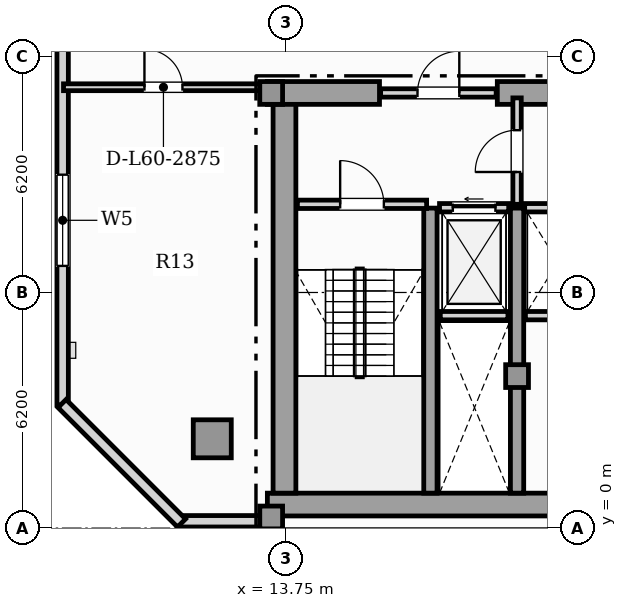
"""IFC4 building model, lengths in metres.
Left out: names, types, materials, properties, quantities, classifications, styles, units other than length and angle.
Written with IfcOpenShell. Run it as: python <this file> out.ifc"""

import sys

from ifc_helpers import new_model, si_unit, direction, frame, frame_2d, origin, origin_2d, place, context, subcontext, project, spatial, rectangle, hollow_rectangle, extrude, element, fill, save


model = new_model("IFC4")
c1 = context("Model", 3, precision=1e-05, world=origin(), true_north=direction((0.0, 1.0)))
c2 = subcontext(c1, "Body", "Model", "MODEL_VIEW")
j1 = project(units=[si_unit("LENGTHUNIT", "METRE"), si_unit("PLANEANGLEUNIT", "RADIAN")], contexts=[c1])
p1 = place(None, origin())
s1 = spatial("IfcSite", under=j1, at=p1, CompositionType="ELEMENT")
p2 = place(p1, origin())
s2 = spatial("IfcBuilding", under=s1, at=p2, CompositionType="ELEMENT")
p3 = place(p2, frame((0.0, 0.0, 242.65)))
s3 = spatial("IfcBuildingStorey", under=s2, at=p3, CompositionType="ELEMENT", Elevation=242.65)
p4 = place(p3, frame((13.25, 0.62, 0.0), z_axis=(0.0, 0.0, 1.0), x_axis=(1.0, 0.0, 0.0)))
e1 = element("IfcWall", 1, at=p4, inside=s3, PredefinedType="SHEAR", context=c2, shape_type="SweptSolid", body=[
    extrude(rectangle(XDim=31.0, YDim=0.6, at=frame_2d((15.5, 0.0))), origin(), (0.0, 0.0, 1.0), 3.5),
])
p5 = place(p3, frame((13.7, 0.92, 0.0), z_axis=(0.0, 0.0, 1.0), x_axis=(0.0, 1.0, 0.0)))
e2 = element("IfcWall", 2, at=p5, inside=s3, PredefinedType="SHEAR", context=c2, shape_type="SweptSolid", body=[
    extrude(rectangle(XDim=10.53, YDim=0.6, at=frame_2d((5.265, 0.0))), origin(), (0.0, 0.0, 1.0), 3.5),
])
p6 = place(p3, frame((13.25, 11.45, 0.0), z_axis=(0.0, 0.0, 1.0), x_axis=(1.0, 0.0, 0.0)))
e3 = element("IfcWall", 3, at=p6, inside=s3, PredefinedType="SHEAR", context=c2, shape_type="SweptSolid", body=[
    extrude(rectangle(XDim=2.95, YDim=0.6, at=frame_2d((1.475, 0.0))), origin(), (0.0, 0.0, 1.0), 3.5),
])
p7 = place(p3, frame((19.3, 11.45, 0.0), z_axis=(0.0, 0.0, 1.0), x_axis=(1.0, 0.0, 0.0)))
e4 = element("IfcWall", 4, at=p7, inside=s3, PredefinedType="SHEAR", context=c2, shape_type="SweptSolid", body=[
    extrude(rectangle(XDim=7.3, YDim=0.6, at=frame_2d((3.65, 0.0))), origin(), (0.0, 0.0, 1.0), 3.5),
])
for number, where, z_axis, x_axis in (
    (5, (17.54, 0.92, 0.0), (0.0, 0.0, 1.0), (0.0, 1.0, 0.0)),
    (6, (19.82, 0.92, 0.0), (0.0, 0.0, 1.0), (0.0, 1.0, 0.0)),
):
    element("IfcWall", number, at=place(p3, frame(where, z_axis=z_axis, x_axis=x_axis)), inside=s3, PredefinedType="SHEAR", context=c2, shape_type="SweptSolid", body=[
        extrude(rectangle(XDim=7.5, YDim=0.35, at=frame_2d((3.75, 0.0))), origin(), (0.0, 0.0, 1.0), 3.5),
    ])
for number, where, z_axis, x_axis in (
    (7, (13.35, 0.28, 0.0), (0.0, 0.0, 1.0), (1.0, 0.0, 0.0)),
    (8, (13.35, 11.45, 0.0), (0.0, 0.0, 1.0), (1.0, 0.0, 0.0)),
    (9, (19.82, 4.0, 0.0), (0.0, 0.0, 1.0), (1.0, 0.0, 0.0)),
):
    element("IfcColumn", number, at=place(p3, frame(where, z_axis=z_axis, x_axis=x_axis)), inside=s3, PredefinedType="COLUMN", context=c2, shape_type="SweptSolid", body=[
        extrude(rectangle(XDim=0.6, YDim=0.6, at=origin_2d()), origin(), (0.0, 0.0, 1.0), 3.85),
    ])
p8 = place(p3, frame((11.8, 2.35, 0.0), z_axis=(0.0, 0.0, 1.0), x_axis=(1.0, 0.0, 0.0)))
e10 = element("IfcColumn", 10, at=p8, inside=s3, PredefinedType="USERDEFINED", context=c2, shape_type="SweptSolid", body=[
    extrude(hollow_rectangle(XDim=1.0, YDim=1.0, WallThickness=0.06, at=origin_2d()), origin(), (0.0, 0.0, 1.0), 3.85),
])
p9 = place(p3, frame((10.953, 0.18, 0.0), z_axis=(0.0, 0.0, 1.0), x_axis=(1.0, 0.0, 0.0)))
e11 = element("IfcWall", 11, at=p9, inside=s3, PredefinedType="SOLIDWALL", context=c2, shape_type="SweptSolid", body=[
    extrude(rectangle(XDim=2.297, YDim=0.3, at=frame_2d((1.148, 0.0))), origin(), (0.0, 0.0, 1.0), 3.5),
])
p10 = place(p3, frame((7.863, 33.343, 0.0), z_axis=(0.0, 0.0, 1.0), x_axis=(0.0, -1.0, 0.0)))
e12 = element("IfcWall", 12, at=p10, inside=s3, PredefinedType="SOLIDWALL", context=c2, shape_type="SweptSolid", body=[
    extrude(rectangle(XDim=30.103, YDim=0.3, at=frame_2d((15.052, 0.0))), origin(), (0.0, 0.0, 1.0), 3.5),
])
p11 = place(p10, frame((24.044, 0.0, 0.85)))
e13 = element("IfcOpeningElement", 13, at=p11, cuts=e12, PredefinedType="OPENING", context=c2, shape_type="SweptSolid", body=[
    extrude(rectangle(XDim=2.4, YDim=2.0, at=frame_2d((1.2, 1.0))), frame((0.0, 0.16, 0.0), z_axis=(0.0, -1.0, 0.0), x_axis=(1.0, 0.0, 0.0)), (0.0, 0.0, 1.0), 0.32),
])
p12 = place(p10, frame((5.143, 0.0, 0.95)))
e14 = element("IfcOpeningElement", 14, at=p12, cuts=e12, PredefinedType="OPENING", context=c2, shape_type="SweptSolid", body=[
    extrude(rectangle(XDim=0.9, YDim=1.5, at=frame_2d((0.45, 0.75))), frame((0.0, 0.16, 0.0), z_axis=(0.0, -1.0, 0.0), x_axis=(1.0, 0.0, 0.0)), (0.0, 0.0, 1.0), 0.32),
])
p13 = place(p10, frame((10.185, 0.0, 0.88)))
e15 = element("IfcOpeningElement", 15, at=p13, cuts=e12, PredefinedType="OPENING", context=c2, shape_type="SweptSolid", body=[
    extrude(rectangle(XDim=1.65, YDim=2.0, at=frame_2d((0.825, 1.0))), frame((0.0, 0.16, 0.0), z_axis=(0.0, -1.0, 0.0), x_axis=(1.0, 0.0, 0.0)), (0.0, 0.0, 1.0), 0.32),
])
p14 = place(p3, frame((7.848, 3.278, 0.0), z_axis=(0.0, 0.0, 1.0), x_axis=(0.707134240044, -0.707079321262, 0.0)))
e16 = element("IfcWall", 16, at=p14, inside=s3, PredefinedType="SOLIDWALL", context=c2, shape_type="SweptSolid", body=[
    extrude(rectangle(XDim=4.446, YDim=0.3, at=frame_2d((2.223, 0.0))), origin(), (0.0, 0.0, 1.0), 3.5),
])
p15 = place(p3, frame((17.8, 5.59, 0.0), z_axis=(0.0, 0.0, 1.0), x_axis=(1.0, 0.0, 0.0)))
e17 = element("IfcWall", 17, at=p15, inside=s3, PredefinedType="SOLIDWALL", context=c2, shape_type="SweptSolid", body=[
    extrude(rectangle(XDim=1.78, YDim=0.22, at=frame_2d((0.89, 0.0))), origin(), (0.0, 0.0, 1.0), 3.5),
])
p16 = place(p3, frame((17.78, 8.43, 0.0), z_axis=(0.0, 0.0, 1.0), x_axis=(1.0, 0.0, 0.0)))
e18 = element("IfcWall", 18, at=p16, inside=s3, PredefinedType="SOLIDWALL", context=c2, shape_type="SweptSolid", body=[
    extrude(rectangle(XDim=1.82, YDim=0.22, at=frame_2d((0.91, 0.0))), origin(), (0.0, 0.0, 1.0), 3.5),
])
p17 = place(p16, frame((0.35, 0.0, 0.0)))
e19 = element("IfcOpeningElement", 19, at=p17, cuts=e18, PredefinedType="OPENING", context=c2, shape_type="SweptSolid", body=[
    extrude(rectangle(XDim=1.12, YDim=2.25, at=frame_2d((0.56, 1.125))), frame((0.0, 0.12, 0.0), z_axis=(0.0, -1.0, 0.0), x_axis=(1.0, 0.0, 0.0)), (0.0, 0.0, 1.0), 0.24),
])
p18 = place(p3, frame((20.04, 5.59, 0.0), z_axis=(0.0, 0.0, 1.0), x_axis=(1.0, 0.0, 0.0)))
e20 = element("IfcWall", 20, at=p18, inside=s3, PredefinedType="SOLIDWALL", context=c2, shape_type="SweptSolid", body=[
    extrude(rectangle(XDim=1.7, YDim=0.22, at=frame_2d((0.85, 0.0))), origin(), (0.0, 0.0, 1.0), 3.5),
])
p19 = place(p3, frame((20.02, 8.43, 0.0), z_axis=(0.0, 0.0, 1.0), x_axis=(1.0, 0.0, 0.0)))
e21 = element("IfcWall", 21, at=p19, inside=s3, PredefinedType="SOLIDWALL", context=c2, shape_type="SweptSolid", body=[
    extrude(rectangle(XDim=1.74, YDim=0.22, at=frame_2d((0.87, 0.0))), origin(), (0.0, 0.0, 1.0), 3.5),
])
p20 = place(p3, frame((14.04, 8.52, 0.0), z_axis=(0.0, 0.0, 1.0), x_axis=(1.0, 0.0, 0.0)))
e22 = element("IfcWall", 22, at=p20, inside=s3, PredefinedType="SOLIDWALL", context=c2, shape_type="SweptSolid", body=[
    extrude(rectangle(XDim=3.4, YDim=0.22, at=frame_2d((1.7, 0.0))), origin(), (0.0, 0.0, 1.0), 3.5),
])
p21 = place(p20, frame((1.125, 0.0, 0.0)))
e23 = element("IfcOpeningElement", 23, at=p21, cuts=e22, PredefinedType="OPENING", context=c2, shape_type="SweptSolid", body=[
    extrude(rectangle(XDim=1.15, YDim=2.2, at=frame_2d((0.575, 1.1))), frame((0.0, 0.12, 0.0), z_axis=(0.0, -1.0, 0.0), x_axis=(1.0, 0.0, 0.0)), (0.0, 0.0, 1.0), 0.24),
])
p22 = place(p3, frame((19.82, 8.52, 0.0), z_axis=(0.0, 0.0, 1.0), x_axis=(0.0, 1.0, 0.0)))
e24 = element("IfcWall", 24, at=p22, inside=s3, PredefinedType="SOLIDWALL", context=c2, shape_type="SweptSolid", body=[
    extrude(rectangle(XDim=2.8, YDim=0.22, at=frame_2d((1.4, 0.0))), origin(), (0.0, 0.0, 1.0), 2.956),
])
p23 = place(p22, frame((0.85, 0.0, 0.0)))
e25 = element("IfcOpeningElement", 25, at=p23, cuts=e24, PredefinedType="OPENING", context=c2, shape_type="SweptSolid", body=[
    extrude(rectangle(XDim=1.1, YDim=2.2, at=frame_2d((0.55, 1.1))), frame((0.0, 0.12, 0.0), z_axis=(0.0, -1.0, 0.0), x_axis=(1.0, 0.0, 0.0)), (0.0, 0.0, 1.0), 0.24),
])
p24 = place(p3, frame((16.23, 11.45, 0.0), z_axis=(0.0, 0.0, 1.0), x_axis=(1.0, 0.0, 0.0)))
e26 = element("IfcWall", 26, at=p24, inside=s3, PredefinedType="SOLIDWALL", context=c2, shape_type="SweptSolid", body=[
    extrude(rectangle(XDim=3.04, YDim=0.22, at=frame_2d((1.52, 0.0))), origin(), (0.0, 0.0, 1.0), 3.5),
])
p25 = place(p24, frame((0.97, 0.0, 0.0)))
e27 = element("IfcOpeningElement", 27, at=p25, cuts=e26, PredefinedType="OPENING", context=c2, shape_type="SweptSolid", body=[
    extrude(rectangle(XDim=1.1, YDim=2.2, at=frame_2d((0.55, 1.1))), frame((0.0, 0.12, 0.0), z_axis=(0.0, -1.0, 0.0), x_axis=(1.0, 0.0, 0.0)), (0.0, 0.0, 1.0), 0.24),
])
p26 = place(p3, frame((7.886, 11.6, 0.0), z_axis=(0.0, 0.0, 1.0), x_axis=(1.0, 0.0, 0.0)))
e28 = element("IfcWall", 28, at=p26, inside=s3, PredefinedType="PARTITIONING", context=c2, shape_type="SweptSolid", body=[
    extrude(rectangle(XDim=5.259, YDim=0.18, at=frame_2d((2.63, 0.0))), origin(), (0.0, 0.0, 1.0), 3.5),
])
p27 = place(p26, frame((2.13, 0.0, 0.0)))
e29 = element("IfcOpeningElement", 29, at=p27, cuts=e28, PredefinedType="OPENING", context=c2, shape_type="SweptSolid", body=[
    extrude(rectangle(XDim=1.0, YDim=2.15, at=frame_2d((0.5, 1.075))), frame((0.0, 0.1, 0.0), z_axis=(0.0, -1.0, 0.0), x_axis=(1.0, 0.0, 0.0)), (0.0, 0.0, 1.0), 0.2),
])
p28 = place(p11, origin())
e30 = element("IfcWindow", 30, at=p28, inside=s3, PartitioningType="SINGLE_PANEL", PredefinedType="WINDOW", context=c2, shape_type="SweptSolid", body=[
    extrude(rectangle(XDim=2.4, YDim=2.0, at=frame_2d((1.2, 1.0))), frame((0.0, 0.03, 0.0), z_axis=(0.0, -1.0, 0.0), x_axis=(1.0, 0.0, 0.0)), (0.0, 0.0, 1.0), 0.06),
])
fill(e13, e30)
p29 = place(p17, origin())
e31 = element("IfcDoor", 31, at=p29, inside=s3, OperationType="SLIDING_TO_LEFT", PredefinedType="DOOR", context=c2, shape_type="SweptSolid", body=[
    extrude(rectangle(XDim=1.12, YDim=2.25, at=frame_2d((0.56, 1.125))), frame((0.0, 0.025, 0.0), z_axis=(0.0, -1.0, 0.0), x_axis=(1.0, 0.0, 0.0)), (0.0, 0.0, 1.0), 0.05),
])
fill(e19, e31)
p30 = place(p21, origin())
e32 = element("IfcDoor", 32, at=p30, inside=s3, OperationType="SINGLE_SWING_LEFT", PredefinedType="DOOR", context=c2, shape_type="SweptSolid", body=[
    extrude(rectangle(XDim=1.15, YDim=2.2, at=frame_2d((0.575, 1.1))), frame((0.0, 0.025, 0.0), z_axis=(0.0, -1.0, 0.0), x_axis=(1.0, 0.0, 0.0)), (0.0, 0.0, 1.0), 0.05),
])
fill(e23, e32)
p31 = place(p23, origin())
e33 = element("IfcDoor", 33, at=p31, inside=s3, OperationType="SINGLE_SWING_LEFT", PredefinedType="DOOR", context=c2, shape_type="SweptSolid", body=[
    extrude(rectangle(XDim=1.1, YDim=2.2, at=frame_2d((0.55, 1.1))), frame((0.0, 0.025, 0.0), z_axis=(0.0, -1.0, 0.0), x_axis=(1.0, 0.0, 0.0)), (0.0, 0.0, 1.0), 0.05),
])
fill(e25, e33)
p32 = place(p25, origin())
e34 = element("IfcDoor", 34, at=p32, inside=s3, OperationType="SINGLE_SWING_RIGHT", PredefinedType="DOOR", context=c2, shape_type="SweptSolid", body=[
    extrude(rectangle(XDim=1.1, YDim=2.2, at=frame_2d((0.55, 1.1))), frame((0.0, 0.025, 0.0), z_axis=(0.0, -1.0, 0.0), x_axis=(1.0, 0.0, 0.0)), (0.0, 0.0, 1.0), 0.05),
])
fill(e27, e34)
p33 = place(p27, origin())
e35 = element("IfcDoor", 35, at=p33, inside=s3, OperationType="SINGLE_SWING_LEFT", PredefinedType="DOOR", context=c2, shape_type="SweptSolid", body=[
    extrude(rectangle(XDim=1.0, YDim=2.15, at=frame_2d((0.5, 1.075))), frame((0.0, 0.025, 0.0), z_axis=(0.0, -1.0, 0.0), x_axis=(1.0, 0.0, 0.0)), (0.0, 0.0, 1.0), 0.05),
])
fill(e29, e35)
save(model, sys.argv[1])
